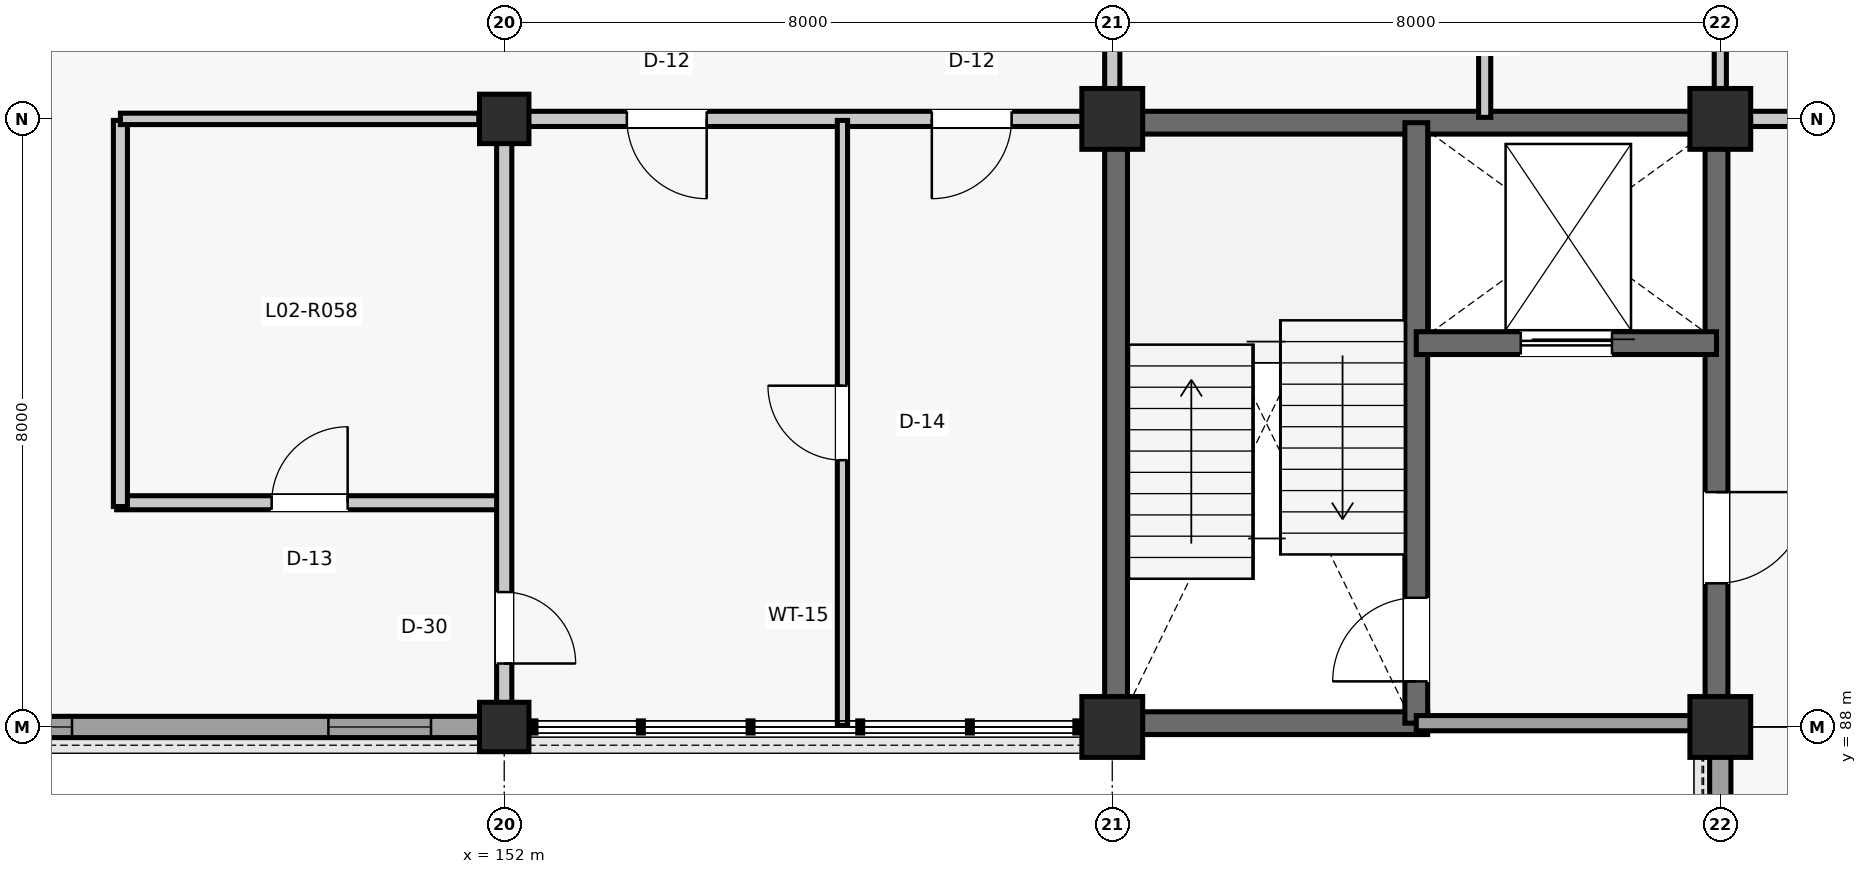
"""IFC4 building model, lengths in metres.
Left out: names, types, materials, properties, quantities, classifications, styles, units other than length and angle.
Written with IfcOpenShell. Run it as: python <this file> out.ifc"""

import sys

from ifc_helpers import new_model, si_unit, direction, frame, frame_2d, origin, origin_2d, place, context, subcontext, project, spatial, rectangle, extrude, element, fill, save


model = new_model("IFC4")
c1 = context("Model", 3, precision=1e-05, world=origin(), true_north=direction((0.0, 1.0)))
c2 = subcontext(c1, "Body", "Model", "MODEL_VIEW")
j1 = project(units=[si_unit("LENGTHUNIT", "METRE"), si_unit("PLANEANGLEUNIT", "RADIAN")], contexts=[c1])
p1 = place(None, origin())
s1 = spatial("IfcSite", under=j1, at=p1, CompositionType="ELEMENT")
p2 = place(p1, origin())
s2 = spatial("IfcBuilding", under=s1, at=p2, CompositionType="ELEMENT")
p3 = place(p2, frame((0.0, 0.0, 9.9)))
s3 = spatial("IfcBuildingStorey", under=s2, at=p3, CompositionType="ELEMENT", Elevation=9.9)
for number, where, z_axis, x_axis in (
    (1, (152.0, 88.0, 0.0), (0.0, 0.0, 1.0), (1.0, 0.0, 0.0)),
    (2, (152.0, 96.0, 0.0), (0.0, 0.0, 1.0), (1.0, 0.0, 0.0)),
):
    element("IfcColumn", number, at=place(p3, frame(where, z_axis=z_axis, x_axis=x_axis)), inside=s3, PredefinedType="COLUMN", context=c2, shape_type="SweptSolid", body=[
        extrude(rectangle(XDim=0.65, YDim=0.65, at=origin_2d()), origin(), (0.0, 0.0, 1.0), 3.96),
    ])
for number, where, z_axis, x_axis in (
    (3, (160.0, 88.0, 0.0), (0.0, 0.0, 1.0), (1.0, 0.0, 0.0)),
    (4, (160.0, 96.0, 0.0), (0.0, 0.0, 1.0), (1.0, 0.0, 0.0)),
    (5, (168.0, 88.0, 0.0), (0.0, 0.0, 1.0), (1.0, 0.0, 0.0)),
    (6, (168.0, 96.0, 0.0), (0.0, 0.0, 1.0), (1.0, 0.0, 0.0)),
):
    element("IfcColumn", number, at=place(p3, frame(where, z_axis=z_axis, x_axis=x_axis)), inside=s3, PredefinedType="COLUMN", context=c2, shape_type="SweptSolid", body=[
        extrude(rectangle(XDim=0.8, YDim=0.8, at=origin_2d()), origin(), (0.0, 0.0, 1.0), 3.96),
    ])
p4 = place(p3, frame((144.31, 88.0, 0.0), z_axis=(0.0, 0.0, 1.0), x_axis=(1.0, 0.0, 0.0)))
e7 = element("IfcWall", 7, at=p4, inside=s3, PredefinedType="SOLIDWALL", context=c2, shape_type="SweptSolid", body=[
    extrude(rectangle(XDim=7.38, YDim=0.28, at=frame_2d((3.69, 0.0))), origin(), (0.0, 0.0, 1.0), 3.347),
])
p5 = place(p4, frame((0.653, 0.0, 0.95)))
e8 = element("IfcOpeningElement", 8, at=p5, cuts=e7, PredefinedType="OPENING", context=c2, shape_type="SweptSolid", body=[
    extrude(rectangle(XDim=1.35, YDim=1.9, at=frame_2d((0.675, 0.95))), frame((0.0, 0.15, 0.0), z_axis=(0.0, -1.0, 0.0), x_axis=(1.0, 0.0, 0.0)), (0.0, 0.0, 1.0), 0.3),
])
p6 = place(p4, frame((5.377, 0.0, 0.95)))
e9 = element("IfcOpeningElement", 9, at=p6, cuts=e7, PredefinedType="OPENING", context=c2, shape_type="SweptSolid", body=[
    extrude(rectangle(XDim=1.35, YDim=1.9, at=frame_2d((0.675, 0.95))), frame((0.0, 0.15, 0.0), z_axis=(0.0, -1.0, 0.0), x_axis=(1.0, 0.0, 0.0)), (0.0, 0.0, 1.0), 0.3),
])
p7 = place(p3, frame((168.0, 80.31, 0.0), z_axis=(0.0, 0.0, 1.0), x_axis=(0.0, 1.0, 0.0)))
e10 = element("IfcWall", 10, at=p7, inside=s3, PredefinedType="SOLIDWALL", context=c2, shape_type="SweptSolid", body=[
    extrude(rectangle(XDim=7.305, YDim=0.28, at=frame_2d((3.652, 0.0))), origin(), (0.0, 0.0, 1.0), 3.344),
])
p8 = place(p7, frame((0.675, 0.0, 0.95)))
e11 = element("IfcOpeningElement", 11, at=p8, cuts=e10, PredefinedType="OPENING", context=c2, shape_type="SweptSolid", body=[
    extrude(rectangle(XDim=1.28, YDim=1.72, at=frame_2d((0.64, 0.86))), frame((0.0, 0.15, 0.0), z_axis=(0.0, -1.0, 0.0), x_axis=(1.0, 0.0, 0.0)), (0.0, 0.0, 1.0), 0.3),
])
p9 = place(p7, frame((5.35, 0.0, 0.95)))
e12 = element("IfcOpeningElement", 12, at=p9, cuts=e10, PredefinedType="OPENING", context=c2, shape_type="SweptSolid", body=[
    extrude(rectangle(XDim=1.28, YDim=1.72, at=frame_2d((0.64, 0.86))), frame((0.0, 0.15, 0.0), z_axis=(0.0, -1.0, 0.0), x_axis=(1.0, 0.0, 0.0)), (0.0, 0.0, 1.0), 0.3),
])
for number, where, z_axis, x_axis in (
    (13, (160.05, 88.29, 0.0), (0.0, 0.0, 1.0), (0.0, 1.0, 0.0)),
    (14, (160.29, 95.95, 0.0), (0.0, 0.0, 1.0), (1.0, 0.0, 0.0)),
):
    element("IfcWall", number, at=place(p3, frame(where, z_axis=z_axis, x_axis=x_axis)), inside=s3, PredefinedType="SHEAR", context=c2, shape_type="SweptSolid", body=[
        extrude(rectangle(XDim=7.42, YDim=0.3, at=frame_2d((3.71, 0.0))), origin(), (0.0, 0.0, 1.0), 3.705),
    ])
p10 = place(p3, frame((167.95, 88.29, 0.0), z_axis=(0.0, 0.0, 1.0), x_axis=(0.0, 1.0, 0.0)))
e15 = element("IfcWall", 15, at=p10, inside=s3, PredefinedType="SHEAR", context=c2, shape_type="SweptSolid", body=[
    extrude(rectangle(XDim=7.42, YDim=0.3, at=frame_2d((3.71, 0.0))), origin(), (0.0, 0.0, 1.0), 3.705),
])
p11 = place(p10, frame((1.6, 0.0, 0.0)))
e16 = element("IfcOpeningElement", 16, at=p11, cuts=e15, PredefinedType="OPENING", context=c2, shape_type="SweptSolid", body=[
    extrude(rectangle(XDim=1.2, YDim=2.15, at=frame_2d((0.6, 1.075))), frame((0.0, 0.16, 0.0), z_axis=(0.0, -1.0, 0.0), x_axis=(1.0, 0.0, 0.0)), (0.0, 0.0, 1.0), 0.32),
])
p12 = place(p3, frame((160.29, 88.05, 0.0), z_axis=(0.0, 0.0, 1.0), x_axis=(1.0, 0.0, 0.0)))
e17 = element("IfcWall", 17, at=p12, inside=s3, PredefinedType="SHEAR", context=c2, shape_type="SweptSolid", body=[
    extrude(rectangle(XDim=3.86, YDim=0.3, at=frame_2d((1.93, 0.0))), origin(), (0.0, 0.0, 1.0), 3.705),
])
p13 = place(p3, frame((164.0, 88.05, 0.0), z_axis=(0.0, 0.0, 1.0), x_axis=(0.0, 1.0, 0.0)))
e18 = element("IfcWall", 18, at=p13, inside=s3, PredefinedType="SHEAR", context=c2, shape_type="SweptSolid", body=[
    extrude(rectangle(XDim=7.9, YDim=0.3, at=frame_2d((3.95, 0.0))), origin(), (0.0, 0.0, 1.0), 3.705),
])
p14 = place(p13, frame((0.55, 0.0, 0.0)))
e19 = element("IfcOpeningElement", 19, at=p14, cuts=e18, PredefinedType="OPENING", context=c2, shape_type="SweptSolid", body=[
    extrude(rectangle(XDim=1.1, YDim=2.15, at=frame_2d((0.55, 1.075))), frame((0.0, 0.16, 0.0), z_axis=(0.0, -1.0, 0.0), x_axis=(1.0, 0.0, 0.0)), (0.0, 0.0, 1.0), 0.32),
])
p15 = place(p3, frame((164.0, 93.05, 0.0), z_axis=(0.0, 0.0, 1.0), x_axis=(1.0, 0.0, 0.0)))
e20 = element("IfcWall", 20, at=p15, inside=s3, PredefinedType="SHEAR", context=c2, shape_type="SweptSolid", body=[
    extrude(rectangle(XDim=3.95, YDim=0.3, at=frame_2d((1.975, 0.0))), origin(), (0.0, 0.0, 1.0), 3.705),
])
p16 = place(p15, frame((1.375, 0.0, 0.0)))
e21 = element("IfcOpeningElement", 21, at=p16, cuts=e20, PredefinedType="OPENING", context=c2, shape_type="SweptSolid", body=[
    extrude(rectangle(XDim=1.2, YDim=2.2, at=frame_2d((0.6, 1.1))), frame((0.0, 0.16, 0.0), z_axis=(0.0, -1.0, 0.0), x_axis=(1.0, 0.0, 0.0)), (0.0, 0.0, 1.0), 0.32),
])
p17 = place(p3, frame((164.0, 88.05, 0.0), z_axis=(0.0, 0.0, 1.0), x_axis=(1.0, 0.0, 0.0)))
e22 = element("IfcWall", 22, at=p17, inside=s3, PredefinedType="PARTITIONING", context=c2, shape_type="SweptSolid", body=[
    extrude(rectangle(XDim=3.61, YDim=0.2, at=frame_2d((1.805, 0.0))), origin(), (0.0, 0.0, 1.0), 3.337),
])
p18 = place(p3, frame((146.9, 90.95, 0.0), z_axis=(0.0, 0.0, 1.0), x_axis=(1.0, 0.0, 0.0)))
e23 = element("IfcWall", 23, at=p18, inside=s3, PredefinedType="PARTITIONING", context=c2, shape_type="SweptSolid", body=[
    extrude(rectangle(XDim=5.08, YDim=0.185, at=frame_2d((2.54, 0.0))), origin(), (0.0, 0.0, 1.0), 3.151),
])
p19 = place(p18, frame((2.04, 0.0, 0.0)))
e24 = element("IfcOpeningElement", 24, at=p19, cuts=e23, PredefinedType="OPENING", context=c2, shape_type="SweptSolid", body=[
    extrude(rectangle(XDim=1.0, YDim=2.15, at=frame_2d((0.5, 1.075))), frame((0.0, 0.103, 0.0), z_axis=(0.0, -1.0, 0.0), x_axis=(1.0, 0.0, 0.0)), (0.0, 0.0, 1.0), 0.205),
])
p20 = place(p3, frame((146.95, 90.9, 0.0), z_axis=(0.0, 0.0, 1.0), x_axis=(0.0, 1.0, 0.0)))
e25 = element("IfcWall", 25, at=p20, inside=s3, PredefinedType="PARTITIONING", context=c2, shape_type="SweptSolid", body=[
    extrude(rectangle(XDim=5.08, YDim=0.185, at=frame_2d((2.54, 0.0))), origin(), (0.0, 0.0, 1.0), 3.141),
])
p21 = place(p3, frame((146.95, 96.0, 0.0), z_axis=(0.0, 0.0, 1.0), x_axis=(1.0, 0.0, 0.0)))
e26 = element("IfcWall", 26, at=p21, inside=s3, PredefinedType="PARTITIONING", context=c2, shape_type="SweptSolid", body=[
    extrude(rectangle(XDim=4.715, YDim=0.15, at=frame_2d((2.357, 0.0))), origin(), (0.0, 0.0, 1.0), 3.141),
])
p22 = place(p3, frame((152.0, 88.315, 0.0), z_axis=(0.0, 0.0, 1.0), x_axis=(0.0, 1.0, 0.0)))
e27 = element("IfcWall", 27, at=p22, inside=s3, PredefinedType="PARTITIONING", context=c2, shape_type="SweptSolid", body=[
    extrude(rectangle(XDim=7.37, YDim=0.2, at=frame_2d((3.685, 0.0))), origin(), (0.0, 0.0, 1.0), 3.151),
])
p23 = place(p22, frame((0.52, 0.0, 0.0)))
e28 = element("IfcOpeningElement", 28, at=p23, cuts=e27, PredefinedType="OPENING", context=c2, shape_type="SweptSolid", body=[
    extrude(rectangle(XDim=0.94, YDim=2.12, at=frame_2d((0.47, 1.06))), frame((0.0, 0.11, 0.0), z_axis=(0.0, -1.0, 0.0), x_axis=(1.0, 0.0, 0.0)), (0.0, 0.0, 1.0), 0.22),
])
p24 = place(p3, frame((152.315, 96.0, 0.0), z_axis=(0.0, 0.0, 1.0), x_axis=(1.0, 0.0, 0.0)))
e29 = element("IfcWall", 29, at=p24, inside=s3, PredefinedType="PARTITIONING", context=c2, shape_type="SweptSolid", body=[
    extrude(rectangle(XDim=7.295, YDim=0.2, at=frame_2d((3.647, 0.0))), origin(), (0.0, 0.0, 1.0), 3.151),
])
p25 = place(p24, frame((1.299, 0.0, 0.0)))
e30 = element("IfcOpeningElement", 30, at=p25, cuts=e29, PredefinedType="OPENING", context=c2, shape_type="SweptSolid", body=[
    extrude(rectangle(XDim=1.05, YDim=2.15, at=frame_2d((0.525, 1.075))), frame((0.0, 0.11, 0.0), z_axis=(0.0, -1.0, 0.0), x_axis=(1.0, 0.0, 0.0)), (0.0, 0.0, 1.0), 0.22),
])
p26 = place(p24, frame((5.311, 0.0, 0.0)))
e31 = element("IfcOpeningElement", 31, at=p26, cuts=e29, PredefinedType="OPENING", context=c2, shape_type="SweptSolid", body=[
    extrude(rectangle(XDim=1.05, YDim=2.15, at=frame_2d((0.525, 1.075))), frame((0.0, 0.11, 0.0), z_axis=(0.0, -1.0, 0.0), x_axis=(1.0, 0.0, 0.0)), (0.0, 0.0, 1.0), 0.22),
])
p27 = place(p3, frame((160.0, 96.39, 0.0), z_axis=(0.0, 0.0, 1.0), x_axis=(0.0, 1.0, 0.0)))
e32 = element("IfcWall", 32, at=p27, inside=s3, PredefinedType="PARTITIONING", context=c2, shape_type="SweptSolid", body=[
    extrude(rectangle(XDim=7.295, YDim=0.2, at=frame_2d((3.647, 0.0))), origin(), (0.0, 0.0, 1.0), 3.157),
])
p28 = place(p27, frame((0.52, 0.0, 0.0)))
e33 = element("IfcOpeningElement", 33, at=p28, cuts=e32, PredefinedType="OPENING", context=c2, shape_type="SweptSolid", body=[
    extrude(rectangle(XDim=0.94, YDim=2.12, at=frame_2d((0.47, 1.06))), frame((0.0, 0.11, 0.0), z_axis=(0.0, -1.0, 0.0), x_axis=(1.0, 0.0, 0.0)), (0.0, 0.0, 1.0), 0.22),
])
p29 = place(p3, frame((168.0, 96.39, 0.0), z_axis=(0.0, 0.0, 1.0), x_axis=(0.0, 1.0, 0.0)))
e34 = element("IfcWall", 34, at=p29, inside=s3, PredefinedType="PARTITIONING", context=c2, shape_type="SweptSolid", body=[
    extrude(rectangle(XDim=7.295, YDim=0.16, at=frame_2d((3.647, 0.0))), origin(), (0.0, 0.0, 1.0), 3.227),
])
p30 = place(p3, frame((168.39, 96.0, 0.0), z_axis=(0.0, 0.0, 1.0), x_axis=(1.0, 0.0, 0.0)))
e35 = element("IfcWall", 35, at=p30, inside=s3, PredefinedType="PARTITIONING", context=c2, shape_type="SweptSolid", body=[
    extrude(rectangle(XDim=7.295, YDim=0.2, at=frame_2d((3.647, 0.0))), origin(), (0.0, 0.0, 1.0), 3.157),
])
p31 = place(p30, frame((0.52, 0.0, 0.0)))
e36 = element("IfcOpeningElement", 36, at=p31, cuts=e35, PredefinedType="OPENING", context=c2, shape_type="SweptSolid", body=[
    extrude(rectangle(XDim=0.94, YDim=2.12, at=frame_2d((0.47, 1.06))), frame((0.0, 0.11, 0.0), z_axis=(0.0, -1.0, 0.0), x_axis=(1.0, 0.0, 0.0)), (0.0, 0.0, 1.0), 0.22),
])
p32 = place(p3, frame((156.45, 88.02, 0.0), z_axis=(0.0, 0.0, 1.0), x_axis=(0.0, 1.0, 0.0)))
e37 = element("IfcWall", 37, at=p32, inside=s3, PredefinedType="PARTITIONING", context=c2, shape_type="SweptSolid", body=[
    extrude(rectangle(XDim=7.96, YDim=0.135, at=frame_2d((3.98, 0.0))), origin(), (0.0, 0.0, 1.0), 3.151),
])
p33 = place(p32, frame((3.49, 0.0, 0.0)))
e38 = element("IfcOpeningElement", 38, at=p33, cuts=e37, PredefinedType="OPENING", context=c2, shape_type="SweptSolid", body=[
    extrude(rectangle(XDim=0.98, YDim=2.15, at=frame_2d((0.49, 1.075))), frame((0.0, 0.077, 0.0), z_axis=(0.0, -1.0, 0.0), x_axis=(1.0, 0.0, 0.0)), (0.0, 0.0, 1.0), 0.155),
])
p34 = place(p3, frame((164.9, 96.02, 0.0), z_axis=(0.0, 0.0, 1.0), x_axis=(0.0, 1.0, 0.0)))
e39 = element("IfcWall", 39, at=p34, inside=s3, PredefinedType="PARTITIONING", context=c2, shape_type="SweptSolid", body=[
    extrude(rectangle(XDim=7.96, YDim=0.16, at=frame_2d((3.98, 0.0))), origin(), (0.0, 0.0, 1.0), 3.082),
])
p35 = place(p5, origin())
e40 = element("IfcWindow", 40, at=p35, inside=s3, PartitioningType="SINGLE_PANEL", PredefinedType="WINDOW", context=c2, shape_type="SweptSolid", body=[
    extrude(rectangle(XDim=1.35, YDim=1.9, at=frame_2d((0.675, 0.95))), frame((0.0, 0.03, 0.0), z_axis=(0.0, -1.0, 0.0), x_axis=(1.0, 0.0, 0.0)), (0.0, 0.0, 1.0), 0.06),
])
fill(e8, e40)
p36 = place(p6, origin())
e41 = element("IfcWindow", 41, at=p36, inside=s3, PartitioningType="SINGLE_PANEL", PredefinedType="WINDOW", context=c2, shape_type="SweptSolid", body=[
    extrude(rectangle(XDim=1.35, YDim=1.9, at=frame_2d((0.675, 0.95))), frame((0.0, 0.03, 0.0), z_axis=(0.0, -1.0, 0.0), x_axis=(1.0, 0.0, 0.0)), (0.0, 0.0, 1.0), 0.06),
])
fill(e9, e41)
p37 = place(p14, origin())
e42 = element("IfcDoor", 42, at=p37, inside=s3, OperationType="SINGLE_SWING_LEFT", PredefinedType="DOOR", context=c2, shape_type="SweptSolid", body=[
    extrude(rectangle(XDim=1.1, YDim=2.15, at=frame_2d((0.55, 1.075))), frame((0.0, 0.025, 0.0), z_axis=(0.0, -1.0, 0.0), x_axis=(1.0, 0.0, 0.0)), (0.0, 0.0, 1.0), 0.05),
])
fill(e19, e42)
p38 = place(p16, origin())
e43 = element("IfcDoor", 43, at=p38, inside=s3, OperationType="SLIDING_TO_LEFT", PredefinedType="DOOR", context=c2, shape_type="SweptSolid", body=[
    extrude(rectangle(XDim=1.2, YDim=2.2, at=frame_2d((0.6, 1.1))), frame((0.0, 0.025, 0.0), z_axis=(0.0, -1.0, 0.0), x_axis=(1.0, 0.0, 0.0)), (0.0, 0.0, 1.0), 0.05),
])
fill(e21, e43)
p39 = place(p11, frame((1.2, 0.0, 0.0), z_axis=(0.0, 0.0, 1.0), x_axis=(-1.0, 0.0, 0.0)))
e44 = element("IfcDoor", 44, at=p39, inside=s3, OperationType="SINGLE_SWING_RIGHT", PredefinedType="DOOR", context=c2, shape_type="SweptSolid", body=[
    extrude(rectangle(XDim=1.2, YDim=2.15, at=frame_2d((0.6, 1.075))), frame((0.0, 0.025, 0.0), z_axis=(0.0, -1.0, 0.0), x_axis=(1.0, 0.0, 0.0)), (0.0, 0.0, 1.0), 0.05),
])
fill(e16, e44)
p40 = place(p19, origin())
e45 = element("IfcDoor", 45, at=p40, inside=s3, OperationType="SINGLE_SWING_RIGHT", PredefinedType="DOOR", context=c2, shape_type="SweptSolid", body=[
    extrude(rectangle(XDim=1.0, YDim=2.15, at=frame_2d((0.5, 1.075))), frame((0.0, 0.025, 0.0), z_axis=(0.0, -1.0, 0.0), x_axis=(1.0, 0.0, 0.0)), (0.0, 0.0, 1.0), 0.05),
])
fill(e24, e45)
p41 = place(p23, frame((0.94, 0.0, 0.0), z_axis=(0.0, 0.0, 1.0), x_axis=(-1.0, 0.0, 0.0)))
e46 = element("IfcDoor", 46, at=p41, inside=s3, OperationType="SINGLE_SWING_LEFT", PredefinedType="DOOR", context=c2, shape_type="SweptSolid", body=[
    extrude(rectangle(XDim=0.94, YDim=2.12, at=frame_2d((0.47, 1.06))), frame((0.0, 0.025, 0.0), z_axis=(0.0, -1.0, 0.0), x_axis=(1.0, 0.0, 0.0)), (0.0, 0.0, 1.0), 0.05),
])
fill(e28, e46)
p42 = place(p25, frame((1.05, 0.0, 0.0), z_axis=(0.0, 0.0, 1.0), x_axis=(-1.0, 0.0, 0.0)))
e47 = element("IfcDoor", 47, at=p42, inside=s3, OperationType="SINGLE_SWING_RIGHT", PredefinedType="DOOR", context=c2, shape_type="SweptSolid", body=[
    extrude(rectangle(XDim=1.05, YDim=2.15, at=frame_2d((0.525, 1.075))), frame((0.0, 0.025, 0.0), z_axis=(0.0, -1.0, 0.0), x_axis=(1.0, 0.0, 0.0)), (0.0, 0.0, 1.0), 0.05),
])
fill(e30, e47)
p43 = place(p26, frame((1.05, 0.0, 0.0), z_axis=(0.0, 0.0, 1.0), x_axis=(-1.0, 0.0, 0.0)))
e48 = element("IfcDoor", 48, at=p43, inside=s3, OperationType="SINGLE_SWING_LEFT", PredefinedType="DOOR", context=c2, shape_type="SweptSolid", body=[
    extrude(rectangle(XDim=1.05, YDim=2.15, at=frame_2d((0.525, 1.075))), frame((0.0, 0.025, 0.0), z_axis=(0.0, -1.0, 0.0), x_axis=(1.0, 0.0, 0.0)), (0.0, 0.0, 1.0), 0.05),
])
fill(e31, e48)
p44 = place(p33, origin())
e49 = element("IfcDoor", 49, at=p44, inside=s3, OperationType="SINGLE_SWING_RIGHT", PredefinedType="DOOR", context=c2, shape_type="SweptSolid", body=[
    extrude(rectangle(XDim=0.98, YDim=2.15, at=frame_2d((0.49, 1.075))), frame((0.0, 0.025, 0.0), z_axis=(0.0, -1.0, 0.0), x_axis=(1.0, 0.0, 0.0)), (0.0, 0.0, 1.0), 0.05),
])
fill(e38, e49)
save(model, sys.argv[1])
